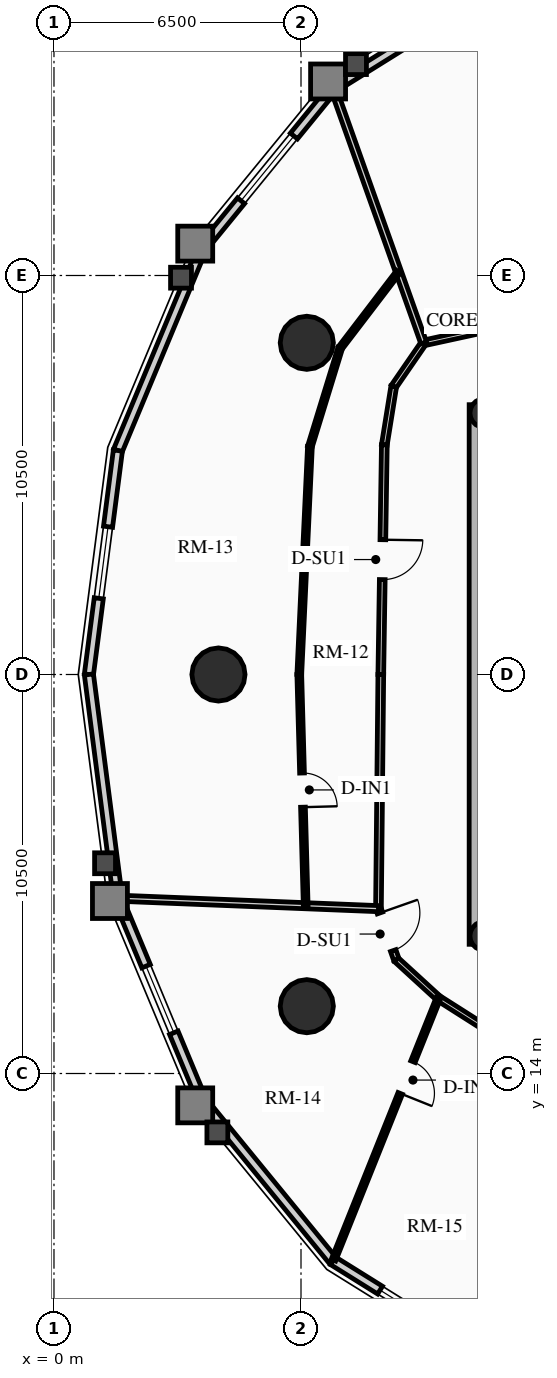
"""IFC4 building model, lengths in metres.
Left out: names, types, materials, properties, quantities, classifications, styles, units other than length and angle.
Written with IfcOpenShell. Run it as: python <this file> out.ifc"""

import sys

from ifc_helpers import new_model, si_unit, direction, frame, frame_2d, origin, origin_2d, place, context, subcontext, project, spatial, rectangle, circle, hollow_circle, extrude, source, transform, mapped, element, fill, save


model = new_model("IFC4")
c1 = context("Model", 3, precision=1e-05, world=origin(), true_north=direction((0.0, 1.0)))
c2 = subcontext(c1, "Body", "Model", "MODEL_VIEW")
j1 = project(units=[si_unit("LENGTHUNIT", "METRE"), si_unit("PLANEANGLEUNIT", "RADIAN")], contexts=[c1])
p1 = place(None, origin())
s1 = spatial("IfcSite", under=j1, at=p1, CompositionType="ELEMENT")
p2 = place(p1, origin())
s2 = spatial("IfcBuilding", under=s1, at=p2, CompositionType="ELEMENT")
p3 = place(p2, frame((0.0, 0.0, 119.62)))
s3 = spatial("IfcBuildingStorey", under=s2, at=p3, CompositionType="ELEMENT", Elevation=119.62)
p4 = place(p3, frame((11.15, 17.4, 0.0), z_axis=(0.0, 0.0, 1.0), x_axis=(0.0, 1.0, 0.0)))
e1 = element("IfcWall", 1, at=p4, inside=s3, PredefinedType="SHEAR", context=c2, shape_type="SweptSolid", body=[
    extrude(rectangle(XDim=14.2, YDim=0.45, at=frame_2d((7.1, 0.0))), origin(), (0.0, 0.0, 1.0), 2.91),
])
for number, where, z_axis, x_axis in (
    (2, (11.325, 17.62, 0.0), (0.0, 0.0, 1.0), (1.0, 0.0, 0.0)),
    (3, (11.325, 31.38, 0.0), (0.0, 0.0, 1.0), (1.0, 0.0, 0.0)),
):
    element("IfcColumn", number, at=place(p3, frame(where, z_axis=z_axis, x_axis=x_axis)), inside=s3, PredefinedType="COLUMN", context=c2, shape_type="SweptSolid", body=[
        extrude(hollow_circle(Radius=0.38, WallThickness=0.032, at=origin_2d()), origin(), (0.0, 0.0, 1.0), 2.91),
    ])
for number, where, z_axis, x_axis in (
    (4, (6.653, 33.229, 0.0), (0.0, 0.0, 1.0), (1.0, 0.0, 0.0)),
    (5, (4.328, 24.5, 0.0), (0.0, 0.0, 1.0), (1.0, 0.0, 0.0)),
    (6, (6.653, 15.771, 0.0), (0.0, 0.0, 1.0), (1.0, 0.0, 0.0)),
):
    element("IfcColumn", number, at=place(p3, frame(where, z_axis=z_axis, x_axis=x_axis)), inside=s3, PredefinedType="USERDEFINED", context=c2, shape_type="SweptSolid", body=[
        extrude(circle(Radius=0.7, at=origin_2d()), origin(), (0.0, 0.0, 1.0), 2.91),
    ])
p5 = place(p3, frame((7.342, 39.928, 0.0), z_axis=(0.0, 0.0, 1.0), x_axis=(0.848520380187, 0.529162701263, 0.0)))
e7 = element("IfcWall", 7, at=p5, inside=s3, PredefinedType="SOLIDWALL", context=c2, shape_type="SweptSolid", body=[
    extrude(rectangle(XDim=5.119, YDim=0.24, at=frame_2d((2.56, 0.0))), origin(), (0.0, 0.0, 1.0), 2.179),
])
p6 = place(p3, frame((3.895, 35.709, 0.0), z_axis=(0.0, 0.0, 1.0), x_axis=(0.632700781152, 0.77439635945, 0.0)))
e8 = element("IfcWall", 8, at=p6, inside=s3, PredefinedType="SOLIDWALL", context=c2, shape_type="SweptSolid", body=[
    extrude(rectangle(XDim=5.448, YDim=0.24, at=frame_2d((2.724, 0.0))), origin(), (0.0, 0.0, 1.0), 2.179),
])
m1 = source(origin(), c2, "Body", "SweptSolid", [
    extrude(rectangle(XDim=2.2, YDim=1.35, at=frame_2d((1.1, 0.675))), frame((0.0, 0.13, 0.0), z_axis=(0.0, -1.0, 0.0), x_axis=(1.0, 0.0, 0.0)), (0.0, 0.0, 1.0), 0.26),
])
p7 = place(p6, frame((1.624, 0.0, 0.65)))
e9 = element("IfcOpeningElement", 9, at=p7, cuts=e8, PredefinedType="OPENING", context=c2, shape_type="MappedRepresentation", body=[
    mapped(m1, transform((0.0, 0.0, 0.0), x_axis=(1.0, 0.0, 0.0), y_axis=(0.0, 1.0, 0.0), z_axis=(0.0, 0.0, 1.0), scale=1.0)),
])
p8 = place(p3, frame((1.682, 30.393, 0.0), z_axis=(0.0, 0.0, 1.0), x_axis=(0.384344417632, 0.923189779317, 0.0)))
e10 = element("IfcWall", 10, at=p8, inside=s3, PredefinedType="SOLIDWALL", context=c2, shape_type="SweptSolid", body=[
    extrude(rectangle(XDim=5.758, YDim=0.24, at=frame_2d((2.879, 0.0))), origin(), (0.0, 0.0, 1.0), 2.179),
])
p9 = place(p3, frame((0.919, 24.5, 0.0), z_axis=(0.0, 0.0, 1.0), x_axis=(0.128351991996, 0.991728675672, 0.0)))
e11 = element("IfcWall", 11, at=p9, inside=s3, PredefinedType="SOLIDWALL", context=c2, shape_type="SweptSolid", body=[
    extrude(rectangle(XDim=5.942, YDim=0.24, at=frame_2d((2.971, 0.0))), origin(), (0.0, 0.0, 1.0), 2.179),
])
m2 = source(origin(), c2, "Body", "SweptSolid", [
    extrude(rectangle(XDim=1.9, YDim=1.35, at=frame_2d((0.95, 0.675))), frame((0.0, 0.13, 0.0), z_axis=(0.0, -1.0, 0.0), x_axis=(1.0, 0.0, 0.0)), (0.0, 0.0, 1.0), 0.26),
])
p10 = place(p9, frame((2.021, 0.0, 0.65)))
e12 = element("IfcOpeningElement", 12, at=p10, cuts=e11, PredefinedType="OPENING", context=c2, shape_type="MappedRepresentation", body=[
    mapped(m2, transform((0.0, 0.0, 0.0), x_axis=(1.0, 0.0, 0.0), y_axis=(0.0, 1.0, 0.0), z_axis=(0.0, 0.0, 1.0), scale=1.0)),
])
p11 = place(p3, frame((1.682, 18.607, 0.0), z_axis=(0.0, 0.0, 1.0), x_axis=(-0.128351991996, 0.991728675672, 0.0)))
e13 = element("IfcWall", 13, at=p11, inside=s3, PredefinedType="SOLIDWALL", context=c2, shape_type="SweptSolid", body=[
    extrude(rectangle(XDim=5.942, YDim=0.24, at=frame_2d((2.971, 0.0))), origin(), (0.0, 0.0, 1.0), 2.179),
])
p12 = place(p3, frame((3.895, 13.291, 0.0), z_axis=(0.0, 0.0, 1.0), x_axis=(-0.384344417632, 0.923189779317, 0.0)))
e14 = element("IfcWall", 14, at=p12, inside=s3, PredefinedType="SOLIDWALL", context=c2, shape_type="SweptSolid", body=[
    extrude(rectangle(XDim=5.758, YDim=0.24, at=frame_2d((2.879, 0.0))), origin(), (0.0, 0.0, 1.0), 2.179),
])
p13 = place(p12, frame((1.929, 0.0, 0.65)))
e15 = element("IfcOpeningElement", 15, at=p13, cuts=e14, PredefinedType="OPENING", context=c2, shape_type="MappedRepresentation", body=[
    mapped(m2, transform((0.0, 0.0, 0.0), x_axis=(1.0, 0.0, 0.0), y_axis=(0.0, 1.0, 0.0), z_axis=(0.0, 0.0, 1.0), scale=1.0)),
])
p14 = place(p3, frame((7.342, 9.072, 0.0), z_axis=(0.0, 0.0, 1.0), x_axis=(-0.632700781152, 0.77439635945, 0.0)))
e16 = element("IfcWall", 16, at=p14, inside=s3, PredefinedType="SOLIDWALL", context=c2, shape_type="SweptSolid", body=[
    extrude(rectangle(XDim=5.448, YDim=0.24, at=frame_2d((2.724, 0.0))), origin(), (0.0, 0.0, 1.0), 2.179),
])
p15 = place(p3, frame((11.685, 6.363, 0.0), z_axis=(0.0, 0.0, 1.0), x_axis=(-0.848520380187, 0.529162701263, 0.0)))
e17 = element("IfcWall", 17, at=p15, inside=s3, PredefinedType="SOLIDWALL", context=c2, shape_type="SweptSolid", body=[
    extrude(rectangle(XDim=5.119, YDim=0.24, at=frame_2d((2.56, 0.0))), origin(), (0.0, 0.0, 1.0), 2.179),
])
p16 = place(p15, frame((1.459, 0.0, 0.65)))
e18 = element("IfcOpeningElement", 18, at=p16, cuts=e17, PredefinedType="OPENING", context=c2, shape_type="MappedRepresentation", body=[
    mapped(m1, transform((0.0, 0.0, 0.0), x_axis=(1.0, 0.0, 0.0), y_axis=(0.0, 1.0, 0.0), z_axis=(0.0, 0.0, 1.0), scale=1.0)),
])
p17 = place(p3, frame((11.62, 33.637, 0.0), z_axis=(0.0, 0.0, 1.0), x_axis=(-0.97702579435, -0.213121085711, 0.0)))
e19 = element("IfcWall", 19, at=p17, inside=s3, PredefinedType="PARTITIONING", context=c2, shape_type="SweptSolid", body=[
    extrude(rectangle(XDim=1.935, YDim=0.15, at=frame_2d((0.967, 0.0))), origin(), (0.0, 0.0, 1.0), 2.225),
])
p18 = place(p3, frame((9.729, 33.225, 0.0), z_axis=(0.0, 0.0, 1.0), x_axis=(-0.567183649484, -0.82359134755, 0.0)))
e20 = element("IfcWall", 20, at=p18, inside=s3, PredefinedType="PARTITIONING", context=c2, shape_type="SweptSolid", body=[
    extrude(rectangle(XDim=1.392, YDim=0.15, at=frame_2d((0.696, 0.0))), origin(), (0.0, 0.0, 1.0), 2.225),
])
p19 = place(p3, frame((8.94, 32.078, 0.0), z_axis=(0.0, 0.0, 1.0), x_axis=(-0.159148467753, -0.98725466077, 0.0)))
e21 = element("IfcWall", 21, at=p19, inside=s3, PredefinedType="PARTITIONING", context=c2, shape_type="SweptSolid", body=[
    extrude(rectangle(XDim=1.554, YDim=0.15, at=frame_2d((0.777, 0.0))), origin(), (0.0, 0.0, 1.0), 2.225),
])
p20 = place(p3, frame((8.693, 30.544, 0.0), z_axis=(0.0, 0.0, 1.0), x_axis=(-0.015307007986, -0.99988284089, 0.0)))
e22 = element("IfcWall", 22, at=p20, inside=s3, PredefinedType="PARTITIONING", context=c2, shape_type="SweptSolid", body=[
    extrude(rectangle(XDim=6.045, YDim=0.15, at=frame_2d((3.022, 0.0))), origin(), (0.0, 0.0, 1.0), 2.655),
])
m3 = source(origin(), c2, "Body", "SweptSolid", [
    extrude(rectangle(XDim=1.05, YDim=2.015, at=frame_2d((0.525, 1.007))), frame((0.0, 0.085, 0.0), z_axis=(0.0, -1.0, 0.0), x_axis=(1.0, 0.0, 0.0)), (0.0, 0.0, 1.0), 0.17),
])
p21 = place(p20, frame((2.497, 0.0, 0.0)))
e23 = element("IfcOpeningElement", 23, at=p21, cuts=e22, PredefinedType="OPENING", context=c2, shape_type="MappedRepresentation", body=[
    mapped(m3, transform((0.0, 0.0, 0.0), x_axis=(1.0, 0.0, 0.0), y_axis=(0.0, 1.0, 0.0), z_axis=(0.0, 0.0, 1.0), scale=1.0)),
])
p22 = place(p3, frame((8.6, 24.5, 0.0), z_axis=(0.0, 0.0, 1.0), x_axis=(-0.010023665349, -0.999949761805, 0.0)))
e24 = element("IfcWall", 24, at=p22, inside=s3, PredefinedType="PARTITIONING", context=c2, shape_type="SweptSolid", body=[
    extrude(rectangle(XDim=6.162, YDim=0.15, at=frame_2d((3.081, 0.0))), origin(), (0.0, 0.0, 1.0), 2.225),
])
p23 = place(p3, frame((8.538, 18.338, 0.0), z_axis=(0.0, 0.0, 1.0), x_axis=(0.331358150167, -0.94350504838, 0.0)))
e25 = element("IfcWall", 25, at=p23, inside=s3, PredefinedType="PARTITIONING", context=c2, shape_type="SweptSolid", body=[
    extrude(rectangle(XDim=1.424, YDim=0.15, at=frame_2d((0.712, 0.0))), origin(), (0.0, 0.0, 1.0), 2.225),
])
p24 = place(p23, frame((0.12, 0.0, 0.0)))
e26 = element("IfcOpeningElement", 26, at=p24, cuts=e25, PredefinedType="OPENING", context=c2, shape_type="MappedRepresentation", body=[
    mapped(m3, transform((0.0, 0.0, 0.0), x_axis=(1.0, 0.0, 0.0), y_axis=(0.0, 1.0, 0.0), z_axis=(0.0, 0.0, 1.0), scale=1.0)),
])
p25 = place(p3, frame((9.01, 16.994, 0.0), z_axis=(0.0, 0.0, 1.0), x_axis=(0.737701798986, -0.67512669609, 0.0)))
e27 = element("IfcWall", 27, at=p25, inside=s3, PredefinedType="PARTITIONING", context=c2, shape_type="SweptSolid", body=[
    extrude(rectangle(XDim=1.498, YDim=0.15, at=frame_2d((0.749, 0.0))), origin(), (0.0, 0.0, 1.0), 2.225),
])
p26 = place(p3, frame((10.115, 15.983, 0.0), z_axis=(0.0, 0.0, 1.0), x_axis=(0.843995849351, -0.536349705209, 0.0)))
e28 = element("IfcWall", 28, at=p26, inside=s3, PredefinedType="PARTITIONING", context=c2, shape_type="SweptSolid", body=[
    extrude(rectangle(XDim=1.593, YDim=0.15, at=frame_2d((0.796, 0.0))), origin(), (0.0, 0.0, 1.0), 2.225),
])
p27 = place(p3, frame((9.729, 33.225, 0.0), z_axis=(0.0, 0.0, 1.0), x_axis=(-0.334806049563, 0.942287063042, 0.0)))
e29 = element("IfcWall", 29, at=p27, inside=s3, PredefinedType="PARTITIONING", context=c2, shape_type="SweptSolid", body=[
    extrude(rectangle(XDim=7.097, YDim=0.16, at=frame_2d((3.548, 0.0))), origin(), (0.0, 0.0, 1.0), 2.179),
])
p28 = place(p3, frame((8.538, 18.338, 0.0), z_axis=(0.0, 0.0, 1.0), x_axis=(-0.999191355531, 0.04020740021, 0.0)))
e30 = element("IfcWall", 30, at=p28, inside=s3, PredefinedType="PARTITIONING", context=c2, shape_type="SweptSolid", body=[
    extrude(rectangle(XDim=6.843, YDim=0.16, at=frame_2d((3.422, 0.0))), origin(), (0.0, 0.0, 1.0), 2.179),
])
p29 = place(p3, frame((9.064, 35.097, 0.0), z_axis=(0.0, 0.0, 1.0), x_axis=(-0.607126893664, -0.794604892377, 0.0)))
e31 = element("IfcWall", 31, at=p29, inside=s3, PredefinedType="PARTITIONING", context=c2, shape_type="SweptSolid", body=[
    extrude(rectangle(XDim=2.524, YDim=0.125, at=frame_2d((1.262, 0.0))), origin(), (0.0, 0.0, 1.0), 2.179),
])
p30 = place(p3, frame((7.532, 33.092, 0.0), z_axis=(0.0, 0.0, 1.0), x_axis=(-0.293965637063, -0.955815988685, 0.0)))
e32 = element("IfcWall", 32, at=p30, inside=s3, PredefinedType="PARTITIONING", context=c2, shape_type="SweptSolid", body=[
    extrude(rectangle(XDim=2.712, YDim=0.125, at=frame_2d((1.356, 0.0))), origin(), (0.0, 0.0, 1.0), 2.225),
])
p31 = place(p3, frame((6.735, 30.5, 0.0), z_axis=(0.0, 0.0, 1.0), x_axis=(-0.046620801603, -0.998912659274, 0.0)))
e33 = element("IfcWall", 33, at=p31, inside=s3, PredefinedType="PARTITIONING", context=c2, shape_type="SweptSolid", body=[
    extrude(rectangle(XDim=6.007, YDim=0.125, at=frame_2d((3.003, 0.0))), origin(), (0.0, 0.0, 1.0), 2.655),
])
p32 = place(p3, frame((6.455, 24.5, 0.0), z_axis=(0.0, 0.0, 1.0), x_axis=(0.027753708707, -0.999614791634, 0.0)))
e34 = element("IfcWall", 34, at=p32, inside=s3, PredefinedType="PARTITIONING", context=c2, shape_type="SweptSolid", body=[
    extrude(rectangle(XDim=6.087, YDim=0.125, at=frame_2d((3.044, 0.0))), origin(), (0.0, 0.0, 1.0), 2.225),
])
m4 = source(origin(), c2, "Body", "SweptSolid", [
    extrude(rectangle(XDim=0.9, YDim=2.005, at=frame_2d((0.45, 1.002))), frame((0.0, 0.073, 0.0), z_axis=(0.0, -1.0, 0.0), x_axis=(1.0, 0.0, 0.0)), (0.0, 0.0, 1.0), 0.145),
])
p33 = place(p32, frame((2.594, 0.0, 0.0)))
e35 = element("IfcOpeningElement", 35, at=p33, cuts=e34, PredefinedType="OPENING", context=c2, shape_type="MappedRepresentation", body=[
    mapped(m4, transform((0.0, 0.0, 0.0), x_axis=(1.0, 0.0, 0.0), y_axis=(0.0, 1.0, 0.0), z_axis=(0.0, 0.0, 1.0), scale=1.0)),
])
p34 = place(p3, frame((10.115, 15.983, 0.0), z_axis=(0.0, 0.0, 1.0), x_axis=(-0.371861013147, -0.928288417951, 0.0)))
e36 = element("IfcWall", 36, at=p34, inside=s3, PredefinedType="PARTITIONING", context=c2, shape_type="SweptSolid", body=[
    extrude(rectangle(XDim=7.427, YDim=0.125, at=frame_2d((3.714, 0.0))), origin(), (0.0, 0.0, 1.0), 2.179),
])
p35 = place(p34, frame((1.8, 0.0, 0.0)))
e37 = element("IfcOpeningElement", 37, at=p35, cuts=e36, PredefinedType="OPENING", context=c2, shape_type="MappedRepresentation", body=[
    mapped(m4, transform((0.0, 0.0, 0.0), x_axis=(1.0, 0.0, 0.0), y_axis=(0.0, 1.0, 0.0), z_axis=(0.0, 0.0, 1.0), scale=1.0)),
])
m5 = source(origin(), c2, "Body", "SweptSolid", [
    extrude(rectangle(XDim=2.2, YDim=1.35, at=frame_2d((1.1, 0.675))), frame((0.0, 0.03, 0.0), z_axis=(0.0, -1.0, 0.0), x_axis=(1.0, 0.0, 0.0)), (0.0, 0.0, 1.0), 0.06),
])
p36 = place(p7, origin())
e38 = element("IfcWindow", 38, at=p36, inside=s3, PartitioningType="DOUBLE_PANEL_VERTICAL", PredefinedType="WINDOW", context=c2, shape_type="MappedRepresentation", body=[
    mapped(m5, transform((0.0, 0.0, 0.0), x_axis=(1.0, 0.0, 0.0), y_axis=(0.0, 1.0, 0.0), z_axis=(0.0, 0.0, 1.0), scale=1.0)),
])
fill(e9, e38)
m6 = source(origin(), c2, "Body", "SweptSolid", [
    extrude(rectangle(XDim=1.9, YDim=1.35, at=frame_2d((0.95, 0.675))), frame((0.0, 0.03, 0.0), z_axis=(0.0, -1.0, 0.0), x_axis=(1.0, 0.0, 0.0)), (0.0, 0.0, 1.0), 0.06),
])
p37 = place(p10, origin())
e39 = element("IfcWindow", 39, at=p37, inside=s3, PartitioningType="DOUBLE_PANEL_VERTICAL", PredefinedType="WINDOW", context=c2, shape_type="MappedRepresentation", body=[
    mapped(m6, transform((0.0, 0.0, 0.0), x_axis=(1.0, 0.0, 0.0), y_axis=(0.0, 1.0, 0.0), z_axis=(0.0, 0.0, 1.0), scale=1.0)),
])
fill(e12, e39)
p38 = place(p13, origin())
e40 = element("IfcWindow", 40, at=p38, inside=s3, PartitioningType="DOUBLE_PANEL_VERTICAL", PredefinedType="WINDOW", context=c2, shape_type="MappedRepresentation", body=[
    mapped(m6, transform((0.0, 0.0, 0.0), x_axis=(1.0, 0.0, 0.0), y_axis=(0.0, 1.0, 0.0), z_axis=(0.0, 0.0, 1.0), scale=1.0)),
])
fill(e15, e40)
p39 = place(p16, origin())
e41 = element("IfcWindow", 41, at=p39, inside=s3, PartitioningType="DOUBLE_PANEL_VERTICAL", PredefinedType="WINDOW", context=c2, shape_type="MappedRepresentation", body=[
    mapped(m5, transform((0.0, 0.0, 0.0), x_axis=(1.0, 0.0, 0.0), y_axis=(0.0, 1.0, 0.0), z_axis=(0.0, 0.0, 1.0), scale=1.0)),
])
fill(e18, e41)
m7 = source(origin(), c2, "Body", "SweptSolid", [
    extrude(rectangle(XDim=1.05, YDim=2.015, at=frame_2d((0.525, 1.007))), frame((0.0, 0.025, 0.0), z_axis=(0.0, -1.0, 0.0), x_axis=(1.0, 0.0, 0.0)), (0.0, 0.0, 1.0), 0.05),
])
p40 = place(p21, origin())
e42 = element("IfcDoor", 42, at=p40, inside=s3, OperationType="SINGLE_SWING_LEFT", PredefinedType="DOOR", context=c2, shape_type="MappedRepresentation", body=[
    mapped(m7, transform((0.0, 0.0, 0.0), x_axis=(1.0, 0.0, 0.0), y_axis=(0.0, 1.0, 0.0), z_axis=(0.0, 0.0, 1.0), scale=1.0)),
])
fill(e23, e42)
m8 = source(origin(), c2, "Body", "SweptSolid", [
    extrude(rectangle(XDim=0.9, YDim=2.005, at=frame_2d((0.45, 1.002))), frame((0.0, 0.025, 0.0), z_axis=(0.0, -1.0, 0.0), x_axis=(1.0, 0.0, 0.0)), (0.0, 0.0, 1.0), 0.05),
])
p41 = place(p33, origin())
e43 = element("IfcDoor", 43, at=p41, inside=s3, OperationType="SINGLE_SWING_RIGHT", PredefinedType="DOOR", context=c2, shape_type="MappedRepresentation", body=[
    mapped(m8, transform((0.0, 0.0, 0.0), x_axis=(1.0, 0.0, 0.0), y_axis=(0.0, 1.0, 0.0), z_axis=(0.0, 0.0, 1.0), scale=1.0)),
])
fill(e35, e43)
p42 = place(p24, origin())
e44 = element("IfcDoor", 44, at=p42, inside=s3, OperationType="SINGLE_SWING_LEFT", PredefinedType="DOOR", context=c2, shape_type="MappedRepresentation", body=[
    mapped(m7, transform((0.0, 0.0, 0.0), x_axis=(1.0, 0.0, 0.0), y_axis=(0.0, 1.0, 0.0), z_axis=(0.0, 0.0, 1.0), scale=1.0)),
])
fill(e26, e44)
p43 = place(p35, origin())
e45 = element("IfcDoor", 45, at=p43, inside=s3, OperationType="SINGLE_SWING_RIGHT", PredefinedType="DOOR", context=c2, shape_type="MappedRepresentation", body=[
    mapped(m8, transform((0.0, 0.0, 0.0), x_axis=(1.0, 0.0, 0.0), y_axis=(0.0, 1.0, 0.0), z_axis=(0.0, 0.0, 1.0), scale=1.0)),
])
fill(e37, e45)
save(model, sys.argv[1])
